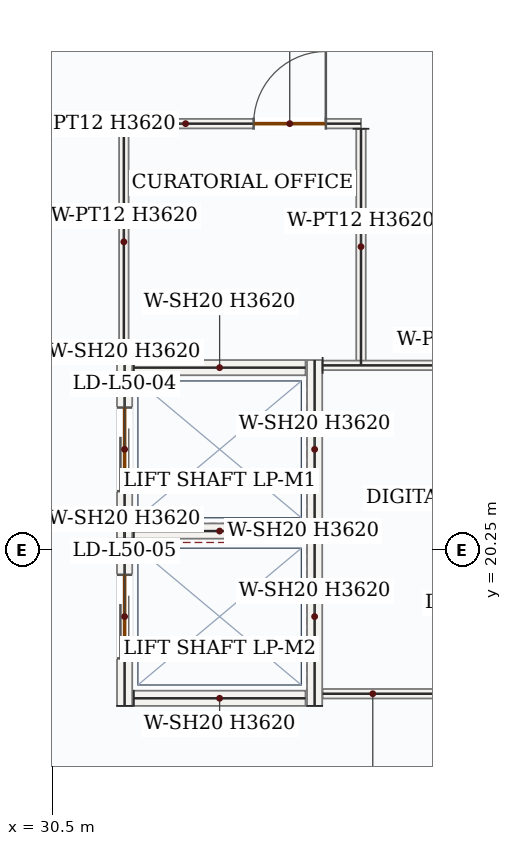
"""IFC4 building model, lengths in metres.
Left out: names, types, materials, properties, quantities, classifications, styles, units other than length and angle.
Written with IfcOpenShell. Run it as: python <this file> out.ifc"""

import sys

from ifc_helpers import new_model, si_unit, direction, frame, frame_2d, origin, place, context, subcontext, project, spatial, rectangle, extrude, source, transform, mapped, element, fill, save


model = new_model("IFC4")
c1 = context("Model", 3, precision=1e-05, world=origin(), true_north=direction((0.0, 1.0)))
c2 = subcontext(c1, "Body", "Model", "MODEL_VIEW")
j1 = project(units=[si_unit("LENGTHUNIT", "METRE"), si_unit("PLANEANGLEUNIT", "RADIAN")], contexts=[c1])
p1 = place(None, origin())
s1 = spatial("IfcSite", under=j1, at=p1, CompositionType="ELEMENT")
p2 = place(p1, origin())
s2 = spatial("IfcBuilding", under=s1, at=p2, CompositionType="ELEMENT")
p3 = place(p2, frame((0.0, 0.0, 213.6)))
s3 = spatial("IfcBuildingStorey", under=s2, at=p3, CompositionType="ELEMENT", Elevation=213.6)
p4 = place(p3, frame((31.45, 20.4, 0.0), z_axis=(0.0, 0.0, 1.0), x_axis=(0.0, 1.0, 0.0)))
e1 = element("IfcWall", 1, at=p4, inside=s3, PredefinedType="SOLIDWALL", context=c2, shape_type="SweptSolid", body=[
    extrude(rectangle(XDim=2.35, YDim=0.2, at=frame_2d((1.175, 0.0))), origin(), (0.0, 0.0, 1.0), 3.62),
])
p5 = place(p4, frame((0.625, 0.0, 0.0)))
e2 = element("IfcOpeningElement", 2, at=p5, cuts=e1, PredefinedType="OPENING", context=c2, shape_type="SweptSolid", body=[
    extrude(rectangle(XDim=1.1, YDim=2.15, at=frame_2d((0.55, 1.075))), frame((0.0, 0.11, 0.0), z_axis=(0.0, -1.0, 0.0), x_axis=(1.0, 0.0, 0.0)), (0.0, 0.0, 1.0), 0.22),
])
m1 = source(origin(), c2, "Body", "SweptSolid", [
    extrude(rectangle(XDim=2.35, YDim=0.2, at=frame_2d((1.175, 0.0))), origin(), (0.0, 0.0, 1.0), 3.62),
])
p6 = place(p3, frame((33.95, 20.4, 0.0), z_axis=(0.0, 0.0, 1.0), x_axis=(0.0, 1.0, 0.0)))
e3 = element("IfcWall", 3, at=p6, inside=s3, PredefinedType="SOLIDWALL", context=c2, shape_type="MappedRepresentation", body=[
    mapped(m1, transform((0.0, 0.0, 0.0), x_axis=(1.0, 0.0, 0.0), y_axis=(0.0, 1.0, 0.0), z_axis=(0.0, 0.0, 1.0), scale=1.0)),
])
m2 = source(origin(), c2, "Body", "SweptSolid", [
    extrude(rectangle(XDim=2.26, YDim=0.2, at=frame_2d((1.13, 0.0))), origin(), (0.0, 0.0, 1.0), 3.62),
])
for number, where, z_axis, x_axis in (
    (4, (31.57, 20.5, 0.0), (0.0, 0.0, 1.0), (1.0, 0.0, 0.0)),
    (5, (31.57, 22.65, 0.0), (0.0, 0.0, 1.0), (1.0, 0.0, 0.0)),
):
    element("IfcWall", number, at=place(p3, frame(where, z_axis=z_axis, x_axis=x_axis)), inside=s3, PredefinedType="SOLIDWALL", context=c2, shape_type="MappedRepresentation", body=[
        mapped(m2, transform((0.0, 0.0, 0.0), x_axis=(1.0, 0.0, 0.0), y_axis=(0.0, 1.0, 0.0), z_axis=(0.0, 0.0, 1.0), scale=1.0)),
    ])
p7 = place(p3, frame((31.45, 18.2, 0.0), z_axis=(0.0, 0.0, 1.0), x_axis=(0.0, 1.0, 0.0)))
e6 = element("IfcWall", 6, at=p7, inside=s3, PredefinedType="SOLIDWALL", context=c2, shape_type="SweptSolid", body=[
    extrude(rectangle(XDim=2.35, YDim=0.2, at=frame_2d((1.175, 0.0))), origin(), (0.0, 0.0, 1.0), 3.62),
])
p8 = place(p7, frame((0.625, 0.0, 0.0)))
e7 = element("IfcOpeningElement", 7, at=p8, cuts=e6, PredefinedType="OPENING", context=c2, shape_type="SweptSolid", body=[
    extrude(rectangle(XDim=1.1, YDim=2.15, at=frame_2d((0.55, 1.075))), frame((0.0, 0.11, 0.0), z_axis=(0.0, -1.0, 0.0), x_axis=(1.0, 0.0, 0.0)), (0.0, 0.0, 1.0), 0.22),
])
p9 = place(p3, frame((33.95, 18.2, 0.0), z_axis=(0.0, 0.0, 1.0), x_axis=(0.0, 1.0, 0.0)))
e8 = element("IfcWall", 8, at=p9, inside=s3, PredefinedType="SOLIDWALL", context=c2, shape_type="MappedRepresentation", body=[
    mapped(m1, transform((0.0, 0.0, 0.0), x_axis=(1.0, 0.0, 0.0), y_axis=(0.0, 1.0, 0.0), z_axis=(0.0, 0.0, 1.0), scale=1.0)),
])
p10 = place(p3, frame((31.57, 18.3, 0.0), z_axis=(0.0, 0.0, 1.0), x_axis=(1.0, 0.0, 0.0)))
e9 = element("IfcWall", 9, at=p10, inside=s3, PredefinedType="SOLIDWALL", context=c2, shape_type="MappedRepresentation", body=[
    mapped(m2, transform((0.0, 0.0, 0.0), x_axis=(1.0, 0.0, 0.0), y_axis=(0.0, 1.0, 0.0), z_axis=(0.0, 0.0, 1.0), scale=1.0)),
])
m3 = source(origin(), c2, "Body", "SweptSolid", [
    extrude(rectangle(XDim=3.11, YDim=0.125, at=frame_2d((1.555, 0.0))), origin(), (0.0, 0.0, 1.0), 3.62),
])
p11 = place(p3, frame((31.44, 22.75, 0.0), z_axis=(0.0, 0.0, 1.0), x_axis=(0.0, 1.0, 0.0)))
e10 = element("IfcWall", 10, at=p11, inside=s3, PredefinedType="PARTITIONING", context=c2, shape_type="MappedRepresentation", body=[
    mapped(m3, transform((0.0, 0.0, 0.0), x_axis=(1.0, 0.0, 0.0), y_axis=(0.0, 1.0, 0.0), z_axis=(0.0, 0.0, 1.0), scale=1.0)),
])
p12 = place(p3, frame((31.508, 25.86, 0.0), z_axis=(0.0, 0.0, 1.0), x_axis=(1.0, 0.0, 0.0)))
e11 = element("IfcWall", 11, at=p12, inside=s3, PredefinedType="PARTITIONING", context=c2, shape_type="SweptSolid", body=[
    extrude(rectangle(XDim=3.052, YDim=0.125, at=frame_2d((1.526, 0.0))), origin(), (0.0, 0.0, 1.0), 3.62),
])
p13 = place(p12, frame((1.64, 0.0, 0.0)))
e12 = element("IfcOpeningElement", 12, at=p13, cuts=e11, PredefinedType="OPENING", context=c2, shape_type="SweptSolid", body=[
    extrude(rectangle(XDim=0.95, YDim=2.15, at=frame_2d((0.475, 1.075))), frame((0.0, 0.073, 0.0), z_axis=(0.0, -1.0, 0.0), x_axis=(1.0, 0.0, 0.0)), (0.0, 0.0, 1.0), 0.145),
])
m4 = source(origin(), c2, "Body", "SweptSolid", [
    extrude(rectangle(XDim=3.103, YDim=0.125, at=frame_2d((1.551, 0.0))), origin(), (0.0, 0.0, 1.0), 3.62),
])
p14 = place(p3, frame((34.56, 25.792, 0.0), z_axis=(0.0, 0.0, 1.0), x_axis=(0.0, -1.0, 0.0)))
e13 = element("IfcWall", 13, at=p14, inside=s3, PredefinedType="PARTITIONING", context=c2, shape_type="MappedRepresentation", body=[
    mapped(m4, transform((0.0, 0.0, 0.0), x_axis=(1.0, 0.0, 0.0), y_axis=(0.0, 1.0, 0.0), z_axis=(0.0, 0.0, 1.0), scale=1.0)),
])
m5 = source(origin(), c2, "Body", "SweptSolid", [
    extrude(rectangle(XDim=3.89, YDim=0.125, at=frame_2d((1.945, 0.0))), origin(), (0.0, 0.0, 1.0), 3.62),
])
p15 = place(p3, frame((34.055, 22.68, 0.0), z_axis=(0.0, 0.0, 1.0), x_axis=(1.0, 0.0, 0.0)))
e14 = element("IfcWall", 14, at=p15, inside=s3, PredefinedType="PARTITIONING", context=c2, shape_type="MappedRepresentation", body=[
    mapped(m5, transform((0.0, 0.0, 0.0), x_axis=(1.0, 0.0, 0.0), y_axis=(0.0, 1.0, 0.0), z_axis=(0.0, 0.0, 1.0), scale=1.0)),
])
p16 = place(p3, frame((37.945, 18.36, 0.0), z_axis=(0.0, 0.0, 1.0), x_axis=(-1.0, 0.0, 0.0)))
e15 = element("IfcWall", 15, at=p16, inside=s3, PredefinedType="PARTITIONING", context=c2, shape_type="SweptSolid", body=[
    extrude(rectangle(XDim=3.89, YDim=0.125, at=frame_2d((1.945, 0.0))), origin(), (0.0, 0.0, 1.0), 3.62),
])
p17 = place(p16, frame((1.47, 0.0, 0.0)))
e16 = element("IfcOpeningElement", 16, at=p17, cuts=e15, PredefinedType="OPENING", context=c2, shape_type="SweptSolid", body=[
    extrude(rectangle(XDim=0.95, YDim=2.15, at=frame_2d((0.475, 1.075))), frame((0.0, 0.073, 0.0), z_axis=(0.0, -1.0, 0.0), x_axis=(1.0, 0.0, 0.0)), (0.0, 0.0, 1.0), 0.145),
])
m6 = source(origin(), c2, "Body", "SweptSolid", [
    extrude(rectangle(XDim=1.1, YDim=2.15, at=frame_2d((0.55, 1.075))), frame((0.0, 0.025, 0.0), z_axis=(0.0, -1.0, 0.0), x_axis=(1.0, 0.0, 0.0)), (0.0, 0.0, 1.0), 0.05),
])
p18 = place(p5, origin())
e17 = element("IfcDoor", 17, at=p18, inside=s3, OperationType="DOUBLE_DOOR_SLIDING", PredefinedType="DOOR", context=c2, shape_type="MappedRepresentation", body=[
    mapped(m6, transform((0.0, 0.0, 0.0), x_axis=(1.0, 0.0, 0.0), y_axis=(0.0, 1.0, 0.0), z_axis=(0.0, 0.0, 1.0), scale=1.0)),
])
fill(e2, e17)
p19 = place(p8, origin())
e18 = element("IfcDoor", 18, at=p19, inside=s3, OperationType="DOUBLE_DOOR_SLIDING", PredefinedType="DOOR", context=c2, shape_type="MappedRepresentation", body=[
    mapped(m6, transform((0.0, 0.0, 0.0), x_axis=(1.0, 0.0, 0.0), y_axis=(0.0, 1.0, 0.0), z_axis=(0.0, 0.0, 1.0), scale=1.0)),
])
fill(e7, e18)
m7 = source(origin(), c2, "Body", "SweptSolid", [
    extrude(rectangle(XDim=0.95, YDim=2.15, at=frame_2d((0.475, 1.075))), frame((0.0, 0.025, 0.0), z_axis=(0.0, -1.0, 0.0), x_axis=(1.0, 0.0, 0.0)), (0.0, 0.0, 1.0), 0.05),
])
p20 = place(p13, origin())
e19 = element("IfcDoor", 19, at=p20, inside=s3, OperationType="SINGLE_SWING_RIGHT", PredefinedType="DOOR", context=c2, shape_type="MappedRepresentation", body=[
    mapped(m7, transform((0.0, 0.0, 0.0), x_axis=(1.0, 0.0, 0.0), y_axis=(0.0, 1.0, 0.0), z_axis=(0.0, 0.0, 1.0), scale=1.0)),
])
fill(e12, e19)
save(model, sys.argv[1])
